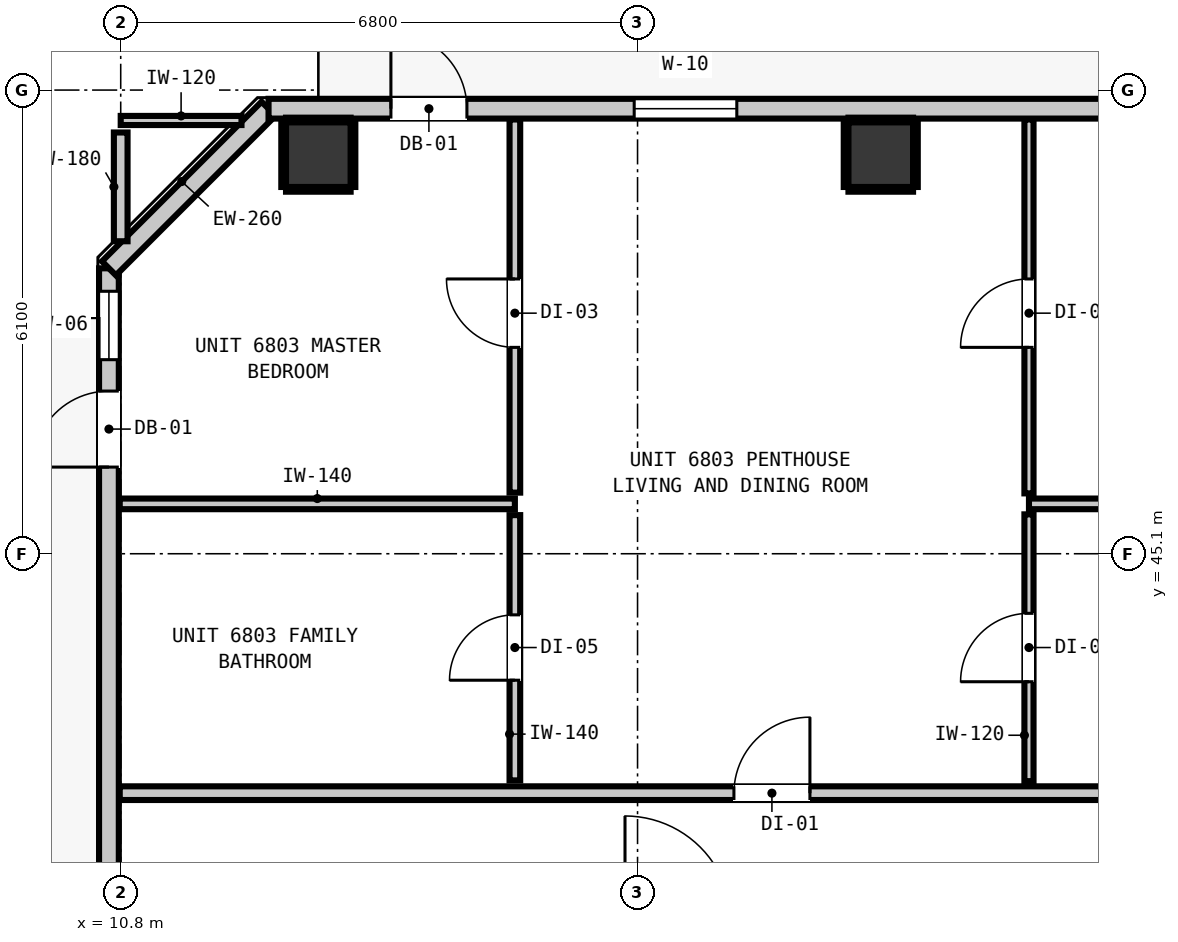
"""IFC4 building model, lengths in metres.
Left out: names, types, materials, properties, quantities, classifications, styles, units other than length and angle.
Written with IfcOpenShell. Run it as: python <this file> out.ifc"""

import sys

from ifc_helpers import new_model, si_unit, direction, frame, frame_2d, origin, origin_2d, place, context, subcontext, project, spatial, rectangle, extrude, element, fill, save


model = new_model("IFC4")
c1 = context("Model", 3, precision=1e-05, world=origin(), true_north=direction((0.0, 1.0)))
c2 = subcontext(c1, "Body", "Model", "MODEL_VIEW")
j1 = project(units=[si_unit("LENGTHUNIT", "METRE"), si_unit("PLANEANGLEUNIT", "RADIAN")], contexts=[c1])
p1 = place(None, origin())
s1 = spatial("IfcSite", under=j1, at=p1, CompositionType="ELEMENT")
p2 = place(p1, origin())
s2 = spatial("IfcBuilding", under=s1, at=p2, CompositionType="ELEMENT")
p3 = place(p2, frame((0.0, 0.0, 234.6)))
s3 = spatial("IfcBuildingStorey", under=s2, at=p3, CompositionType="ELEMENT", Elevation=234.6)
for number, where, z_axis, x_axis in (
    (1, (13.4, 50.35, 0.0), (0.0, 0.0, 1.0), (1.0, 0.0, 0.0)),
    (2, (20.8, 50.35, 0.0), (0.0, 0.0, 1.0), (1.0, 0.0, 0.0)),
):
    element("IfcColumn", number, at=place(p3, frame(where, z_axis=z_axis, x_axis=x_axis)), inside=s3, PredefinedType="COLUMN", context=c2, shape_type="SweptSolid", body=[
        extrude(rectangle(XDim=0.85, YDim=0.85, at=origin_2d()), origin(), (0.0, 0.0, 1.0), 3.32),
    ])
p4 = place(p3, frame((10.645, 18.545, 0.0), z_axis=(0.0, 0.0, 1.0), x_axis=(0.0, 1.0, 0.0)))
e3 = element("IfcWall", 3, at=p4, inside=s3, PredefinedType="STANDARD", context=c2, shape_type="SweptSolid", body=[
    extrude(rectangle(XDim=30.31, YDim=0.26, at=frame_2d((15.155, 0.0))), origin(), (0.0, 0.0, 1.0), 3.1),
])
p5 = place(p4, frame((27.695, 0.0, 0.0)))
e4 = element("IfcOpeningElement", 4, at=p5, cuts=e3, PredefinedType="OPENING", context=c2, shape_type="SweptSolid", body=[
    extrude(rectangle(XDim=1.0, YDim=2.15, at=frame_2d((0.5, 1.075))), frame((0.0, 0.14, 0.0), z_axis=(0.0, -1.0, 0.0), x_axis=(1.0, 0.0, 0.0)), (0.0, 0.0, 1.0), 0.28),
])
p6 = place(p4, frame((29.108, 0.0, 0.85)))
e5 = element("IfcOpeningElement", 5, at=p6, cuts=e3, PredefinedType="OPENING", context=c2, shape_type="SweptSolid", body=[
    extrude(rectangle(XDim=0.9, YDim=1.5, at=frame_2d((0.45, 0.75))), frame((0.0, 0.14, 0.0), z_axis=(0.0, -1.0, 0.0), x_axis=(1.0, 0.0, 0.0)), (0.0, 0.0, 1.0), 0.28),
])
p7 = place(p3, frame((10.645, 48.855, 0.0), z_axis=(0.0, 0.0, 1.0), x_axis=(0.707106781187, 0.707106781187, 0.0)))
e6 = element("IfcWall", 6, at=p7, inside=s3, PredefinedType="STANDARD", context=c2, shape_type="SweptSolid", body=[
    extrude(rectangle(XDim=2.97, YDim=0.26, at=frame_2d((1.485, 0.0))), origin(), (0.0, 0.0, 1.0), 3.1),
])
p8 = place(p3, frame((12.745, 50.955, 0.0), z_axis=(0.0, 0.0, 1.0), x_axis=(1.0, 0.0, 0.0)))
e7 = element("IfcWall", 7, at=p8, inside=s3, PredefinedType="STANDARD", context=c2, shape_type="SweptSolid", body=[
    extrude(rectangle(XDim=32.71, YDim=0.26, at=frame_2d((16.355, 0.0))), origin(), (0.0, 0.0, 1.0), 3.1),
])
p9 = place(p8, frame((1.61, 0.0, 0.0)))
e8 = element("IfcOpeningElement", 8, at=p9, cuts=e7, PredefinedType="OPENING", context=c2, shape_type="SweptSolid", body=[
    extrude(rectangle(XDim=1.0, YDim=2.15, at=frame_2d((0.5, 1.075))), frame((0.0, 0.14, 0.0), z_axis=(0.0, -1.0, 0.0), x_axis=(1.0, 0.0, 0.0)), (0.0, 0.0, 1.0), 0.28),
])
p10 = place(p8, frame((4.811, 0.0, 0.85)))
e9 = element("IfcOpeningElement", 9, at=p10, cuts=e7, PredefinedType="OPENING", context=c2, shape_type="SweptSolid", body=[
    extrude(rectangle(XDim=1.35, YDim=1.85, at=frame_2d((0.675, 0.925))), frame((0.0, 0.14, 0.0), z_axis=(0.0, -1.0, 0.0), x_axis=(1.0, 0.0, 0.0)), (0.0, 0.0, 1.0), 0.28),
])
p11 = place(p8, frame((11.765, 0.0, 0.85)))
e10 = element("IfcOpeningElement", 10, at=p11, cuts=e7, PredefinedType="OPENING", context=c2, shape_type="SweptSolid", body=[
    extrude(rectangle(XDim=1.35, YDim=1.85, at=frame_2d((0.675, 0.925))), frame((0.0, 0.14, 0.0), z_axis=(0.0, -1.0, 0.0), x_axis=(1.0, 0.0, 0.0)), (0.0, 0.0, 1.0), 0.28),
])
p12 = place(p8, frame((18.016, 0.0, 0.85)))
e11 = element("IfcOpeningElement", 11, at=p12, cuts=e7, PredefinedType="OPENING", context=c2, shape_type="SweptSolid", body=[
    extrude(rectangle(XDim=1.35, YDim=1.85, at=frame_2d((0.675, 0.925))), frame((0.0, 0.14, 0.0), z_axis=(0.0, -1.0, 0.0), x_axis=(1.0, 0.0, 0.0)), (0.0, 0.0, 1.0), 0.28),
])
p13 = place(p8, frame((27.725, 0.0, 0.85)))
e12 = element("IfcOpeningElement", 12, at=p13, cuts=e7, PredefinedType="OPENING", context=c2, shape_type="SweptSolid", body=[
    extrude(rectangle(XDim=1.35, YDim=1.85, at=frame_2d((0.675, 0.925))), frame((0.0, 0.14, 0.0), z_axis=(0.0, -1.0, 0.0), x_axis=(1.0, 0.0, 0.0)), (0.0, 0.0, 1.0), 0.28),
])
p14 = place(p3, frame((10.787, 41.95, 0.0), z_axis=(0.0, 0.0, 1.0), x_axis=(1.0, 0.0, 0.0)))
e13 = element("IfcWall", 13, at=p14, inside=s3, PredefinedType="PARTITIONING", context=c2, shape_type="SweptSolid", body=[
    extrude(rectangle(XDim=36.626, YDim=0.18, at=frame_2d((18.313, 0.0))), origin(), (0.0, 0.0, 1.0), 3.1),
])
p15 = place(p14, frame((8.081, 0.0, 0.0)))
e14 = element("IfcOpeningElement", 14, at=p15, cuts=e13, PredefinedType="OPENING", context=c2, shape_type="SweptSolid", body=[
    extrude(rectangle(XDim=1.0, YDim=2.15, at=frame_2d((0.5, 1.075))), frame((0.0, 0.1, 0.0), z_axis=(0.0, -1.0, 0.0), x_axis=(1.0, 0.0, 0.0)), (0.0, 0.0, 1.0), 0.2),
])
p16 = place(p14, frame((29.113, 0.0, 0.0)))
e15 = element("IfcOpeningElement", 15, at=p16, cuts=e13, PredefinedType="OPENING", context=c2, shape_type="SweptSolid", body=[
    extrude(rectangle(XDim=0.9, YDim=2.1, at=frame_2d((0.45, 1.05))), frame((0.0, 0.1, 0.0), z_axis=(0.0, -1.0, 0.0), x_axis=(1.0, 0.0, 0.0)), (0.0, 0.0, 1.0), 0.2),
])
p17 = place(p3, frame((10.787, 45.756, 0.0), z_axis=(0.0, 0.0, 1.0), x_axis=(1.0, 0.0, 0.0)))
e16 = element("IfcWall", 16, at=p17, inside=s3, PredefinedType="PARTITIONING", context=c2, shape_type="SweptSolid", body=[
    extrude(rectangle(XDim=5.199, YDim=0.14, at=frame_2d((2.6, 0.0))), origin(), (0.0, 0.0, 1.0), 3.1),
])
p18 = place(p3, frame((22.75, 45.756, 0.0), z_axis=(0.0, 0.0, 1.0), x_axis=(1.0, 0.0, 0.0)))
e17 = element("IfcWall", 17, at=p18, inside=s3, PredefinedType="PARTITIONING", context=c2, shape_type="SweptSolid", body=[
    extrude(rectangle(XDim=10.598, YDim=0.14, at=frame_2d((5.299, 0.0))), origin(), (0.0, 0.0, 1.0), 3.1),
])
p19 = place(p3, frame((10.8, 50.8, 0.0), z_axis=(0.0, 0.0, 1.0), x_axis=(1.0, 0.0, 0.0)))
e18 = element("IfcWall", 18, at=p19, inside=s3, PredefinedType="PARTITIONING", context=c2, shape_type="SweptSolid", body=[
    extrude(rectangle(XDim=1.589, YDim=0.12, at=frame_2d((0.794, 0.0))), origin(), (0.0, 0.0, 1.0), 3.1),
])
p20 = place(p3, frame((10.8, 49.211, 0.0), z_axis=(0.0, 0.0, 1.0), x_axis=(0.0, 1.0, 0.0)))
e19 = element("IfcWall", 19, at=p20, inside=s3, PredefinedType="PARTITIONING", context=c2, shape_type="SweptSolid", body=[
    extrude(rectangle(XDim=1.431, YDim=0.18, at=frame_2d((0.716, 0.0))), origin(), (0.0, 0.0, 1.0), 3.1),
])
p21 = place(p3, frame((15.986, 42.118, 0.0), z_axis=(0.0, 0.0, 1.0), x_axis=(0.0, 1.0, 0.0)))
e20 = element("IfcWall", 20, at=p21, inside=s3, PredefinedType="PARTITIONING", context=c2, shape_type="SweptSolid", body=[
    extrude(rectangle(XDim=3.49, YDim=0.14, at=frame_2d((1.745, 0.0))), origin(), (0.0, 0.0, 1.0), 3.1),
])
p22 = place(p21, frame((1.318, 0.0, 0.0)))
e21 = element("IfcOpeningElement", 21, at=p22, cuts=e20, PredefinedType="OPENING", context=c2, shape_type="SweptSolid", body=[
    extrude(rectangle(XDim=0.86, YDim=2.02, at=frame_2d((0.43, 1.01))), frame((0.0, 0.08, 0.0), z_axis=(0.0, -1.0, 0.0), x_axis=(1.0, 0.0, 0.0)), (0.0, 0.0, 1.0), 0.16),
])
p23 = place(p3, frame((15.986, 45.904, 0.0), z_axis=(0.0, 0.0, 1.0), x_axis=(0.0, 1.0, 0.0)))
e22 = element("IfcWall", 22, at=p23, inside=s3, PredefinedType="PARTITIONING", context=c2, shape_type="SweptSolid", body=[
    extrude(rectangle(XDim=4.909, YDim=0.14, at=frame_2d((2.455, 0.0))), origin(), (0.0, 0.0, 1.0), 3.1),
])
p24 = place(p23, frame((1.911, 0.0, 0.0)))
e23 = element("IfcOpeningElement", 23, at=p24, cuts=e22, PredefinedType="OPENING", context=c2, shape_type="SweptSolid", body=[
    extrude(rectangle(XDim=0.9, YDim=2.1, at=frame_2d((0.45, 1.05))), frame((0.0, 0.08, 0.0), z_axis=(0.0, -1.0, 0.0), x_axis=(1.0, 0.0, 0.0)), (0.0, 0.0, 1.0), 0.16),
])
p25 = place(p3, frame((22.75, 42.108, 0.0), z_axis=(0.0, 0.0, 1.0), x_axis=(0.0, 1.0, 0.0)))
e24 = element("IfcWall", 24, at=p25, inside=s3, PredefinedType="PARTITIONING", context=c2, shape_type="SweptSolid", body=[
    extrude(rectangle(XDim=3.51, YDim=0.12, at=frame_2d((1.755, 0.0))), origin(), (0.0, 0.0, 1.0), 3.1),
])
p26 = place(p25, frame((1.308, 0.0, 0.0)))
e25 = element("IfcOpeningElement", 25, at=p26, cuts=e24, PredefinedType="OPENING", context=c2, shape_type="SweptSolid", body=[
    extrude(rectangle(XDim=0.9, YDim=2.1, at=frame_2d((0.45, 1.05))), frame((0.0, 0.07, 0.0), z_axis=(0.0, -1.0, 0.0), x_axis=(1.0, 0.0, 0.0)), (0.0, 0.0, 1.0), 0.14),
])
p27 = place(p3, frame((22.75, 45.894, 0.0), z_axis=(0.0, 0.0, 1.0), x_axis=(0.0, 1.0, 0.0)))
e26 = element("IfcWall", 26, at=p27, inside=s3, PredefinedType="PARTITIONING", context=c2, shape_type="SweptSolid", body=[
    extrude(rectangle(XDim=4.919, YDim=0.12, at=frame_2d((2.459, 0.0))), origin(), (0.0, 0.0, 1.0), 3.1),
])
p28 = place(p27, frame((1.921, 0.0, 0.0)))
e27 = element("IfcOpeningElement", 27, at=p28, cuts=e26, PredefinedType="OPENING", context=c2, shape_type="SweptSolid", body=[
    extrude(rectangle(XDim=0.9, YDim=2.1, at=frame_2d((0.45, 1.05))), frame((0.0, 0.07, 0.0), z_axis=(0.0, -1.0, 0.0), x_axis=(1.0, 0.0, 0.0)), (0.0, 0.0, 1.0), 0.14),
])
for number, where, z_axis, x_axis in (
    (28, (12.975, 49.893, 0.0), (0.0, 0.0, 1.0), (1.0, 0.0, 0.0)),
    (29, (12.975, 50.807, 0.0), (0.0, 0.0, 1.0), (1.0, 0.0, 0.0)),
    (30, (12.943, 49.925, 0.0), (0.0, 0.0, 1.0), (0.0, 1.0, 0.0)),
    (31, (13.857, 49.925, 0.0), (0.0, 0.0, 1.0), (0.0, 1.0, 0.0)),
):
    element("IfcWall", number, at=place(p3, frame(where, z_axis=z_axis, x_axis=x_axis)), inside=s3, PredefinedType="PARTITIONING", context=c2, shape_type="SweptSolid", body=[
        extrude(rectangle(XDim=0.85, YDim=0.06, at=frame_2d((0.425, 0.0))), origin(), (0.0, 0.0, 1.0), 1.45),
    ])
for number, where, z_axis, x_axis in (
    (32, (20.375, 49.893, 0.0), (0.0, 0.0, 1.0), (1.0, 0.0, 0.0)),
    (33, (20.375, 50.807, 0.0), (0.0, 0.0, 1.0), (1.0, 0.0, 0.0)),
):
    element("IfcWall", number, at=place(p3, frame(where, z_axis=z_axis, x_axis=x_axis)), inside=s3, PredefinedType="PARTITIONING", context=c2, shape_type="SweptSolid", body=[
        extrude(rectangle(XDim=0.85, YDim=0.06, at=frame_2d((0.425, 0.0))), origin(), (0.0, 0.0, 1.0), 1.45),
    ])
for number, where, z_axis, x_axis in (
    (34, (20.343, 49.925, 0.0), (0.0, 0.0, 1.0), (0.0, 1.0, 0.0)),
    (35, (21.257, 49.925, 0.0), (0.0, 0.0, 1.0), (0.0, 1.0, 0.0)),
):
    element("IfcWall", number, at=place(p3, frame(where, z_axis=z_axis, x_axis=x_axis)), inside=s3, PredefinedType="PARTITIONING", context=c2, shape_type="SweptSolid", body=[
        extrude(rectangle(XDim=0.85, YDim=0.06, at=frame_2d((0.425, 0.0))), origin(), (0.0, 0.0, 1.0), 1.45),
    ])
p29 = place(p9, origin())
e36 = element("IfcDoor", 36, at=p29, inside=s3, OperationType="SINGLE_SWING_LEFT", PredefinedType="DOOR", context=c2, shape_type="SweptSolid", body=[
    extrude(rectangle(XDim=1.0, YDim=2.15, at=frame_2d((0.5, 1.075))), frame((0.0, 0.025, 0.0), z_axis=(0.0, -1.0, 0.0), x_axis=(1.0, 0.0, 0.0)), (0.0, 0.0, 1.0), 0.05),
])
fill(e8, e36)
p30 = place(p5, origin())
e37 = element("IfcDoor", 37, at=p30, inside=s3, OperationType="SINGLE_SWING_LEFT", PredefinedType="DOOR", context=c2, shape_type="SweptSolid", body=[
    extrude(rectangle(XDim=1.0, YDim=2.15, at=frame_2d((0.5, 1.075))), frame((0.0, 0.025, 0.0), z_axis=(0.0, -1.0, 0.0), x_axis=(1.0, 0.0, 0.0)), (0.0, 0.0, 1.0), 0.05),
])
fill(e4, e37)
p31 = place(p6, origin())
e38 = element("IfcWindow", 38, at=p31, inside=s3, PartitioningType="SINGLE_PANEL", PredefinedType="WINDOW", context=c2, shape_type="SweptSolid", body=[
    extrude(rectangle(XDim=0.9, YDim=1.5, at=frame_2d((0.45, 0.75))), frame((0.0, 0.03, 0.0), z_axis=(0.0, -1.0, 0.0), x_axis=(1.0, 0.0, 0.0)), (0.0, 0.0, 1.0), 0.06),
])
fill(e5, e38)
p32 = place(p10, origin())
e39 = element("IfcWindow", 39, at=p32, inside=s3, PartitioningType="SINGLE_PANEL", PredefinedType="WINDOW", context=c2, shape_type="SweptSolid", body=[
    extrude(rectangle(XDim=1.35, YDim=1.85, at=frame_2d((0.675, 0.925))), frame((0.0, 0.03, 0.0), z_axis=(0.0, -1.0, 0.0), x_axis=(1.0, 0.0, 0.0)), (0.0, 0.0, 1.0), 0.06),
])
fill(e9, e39)
p33 = place(p15, origin())
e40 = element("IfcDoor", 40, at=p33, inside=s3, OperationType="SINGLE_SWING_RIGHT", PredefinedType="DOOR", context=c2, shape_type="SweptSolid", body=[
    extrude(rectangle(XDim=1.0, YDim=2.15, at=frame_2d((0.5, 1.075))), frame((0.0, 0.025, 0.0), z_axis=(0.0, -1.0, 0.0), x_axis=(1.0, 0.0, 0.0)), (0.0, 0.0, 1.0), 0.05),
])
fill(e14, e40)
p34 = place(p22, origin())
e41 = element("IfcDoor", 41, at=p34, inside=s3, OperationType="SINGLE_SWING_LEFT", PredefinedType="DOOR", context=c2, shape_type="SweptSolid", body=[
    extrude(rectangle(XDim=0.86, YDim=2.02, at=frame_2d((0.43, 1.01))), frame((0.0, 0.025, 0.0), z_axis=(0.0, -1.0, 0.0), x_axis=(1.0, 0.0, 0.0)), (0.0, 0.0, 1.0), 0.05),
])
fill(e21, e41)
p35 = place(p24, origin())
e42 = element("IfcDoor", 42, at=p35, inside=s3, OperationType="SINGLE_SWING_RIGHT", PredefinedType="DOOR", context=c2, shape_type="SweptSolid", body=[
    extrude(rectangle(XDim=0.9, YDim=2.1, at=frame_2d((0.45, 1.05))), frame((0.0, 0.025, 0.0), z_axis=(0.0, -1.0, 0.0), x_axis=(1.0, 0.0, 0.0)), (0.0, 0.0, 1.0), 0.05),
])
fill(e23, e42)
p36 = place(p26, origin())
e43 = element("IfcDoor", 43, at=p36, inside=s3, OperationType="SINGLE_SWING_LEFT", PredefinedType="DOOR", context=c2, shape_type="SweptSolid", body=[
    extrude(rectangle(XDim=0.9, YDim=2.1, at=frame_2d((0.45, 1.05))), frame((0.0, 0.025, 0.0), z_axis=(0.0, -1.0, 0.0), x_axis=(1.0, 0.0, 0.0)), (0.0, 0.0, 1.0), 0.05),
])
fill(e25, e43)
p37 = place(p28, origin())
e44 = element("IfcDoor", 44, at=p37, inside=s3, OperationType="SINGLE_SWING_LEFT", PredefinedType="DOOR", context=c2, shape_type="SweptSolid", body=[
    extrude(rectangle(XDim=0.9, YDim=2.1, at=frame_2d((0.45, 1.05))), frame((0.0, 0.025, 0.0), z_axis=(0.0, -1.0, 0.0), x_axis=(1.0, 0.0, 0.0)), (0.0, 0.0, 1.0), 0.05),
])
fill(e27, e44)
save(model, sys.argv[1])
